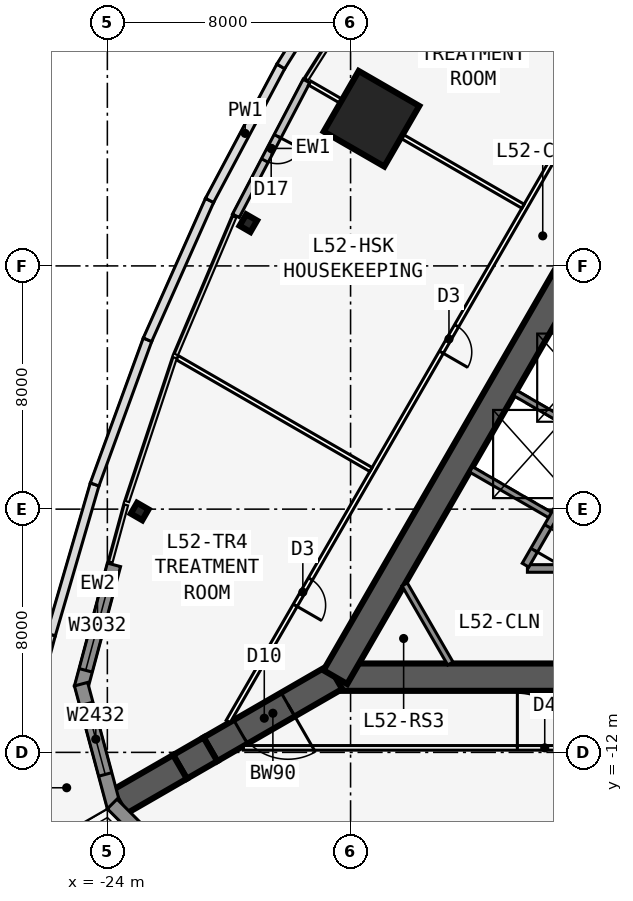
"""IFC4 building model, lengths in metres.
Left out: names, types, materials, properties, quantities, classifications, styles, units other than length and angle.
Written with IfcOpenShell. Run it as: python <this file> out.ifc"""

import sys

from ifc_helpers import new_model, si_unit, direction, frame, frame_2d, origin, origin_2d, place, context, subcontext, project, spatial, polyline, rectangle, i_section, outline, extrude, element, fill, save


model = new_model("IFC4")
c1 = context("Model", 3, precision=1e-05, world=origin(), true_north=direction((0.0, 1.0)))
c2 = subcontext(c1, "Body", "Model", "MODEL_VIEW")
j1 = project(units=[si_unit("LENGTHUNIT", "METRE"), si_unit("PLANEANGLEUNIT", "RADIAN")], contexts=[c1])
p1 = place(None, origin())
s1 = spatial("IfcSite", under=j1, at=p1, CompositionType="ELEMENT")
p2 = place(p1, origin())
s2 = spatial("IfcBuilding", under=s1, at=p2, CompositionType="ELEMENT")
p3 = place(p2, frame((0.0, 0.0, 195.9)))
s3 = spatial("IfcBuildingStorey", under=s2, at=p3, CompositionType="ELEMENT", Elevation=195.9)
p4 = place(p3, frame((-16.5, -9.526, 0.0), z_axis=(0.0, 0.0, 1.0), x_axis=(1.0, 0.0, 0.0)))
e1 = element("IfcWall", 1, at=p4, inside=s3, PredefinedType="SHEAR", context=c2, shape_type="SweptSolid", body=[
    extrude(rectangle(XDim=33.0, YDim=0.9, at=frame_2d((16.5, 0.0))), origin(), (0.0, 0.0, 1.0), 5.0),
])
p5 = place(p4, frame((14.05, 0.0, 0.0)))
e2 = element("IfcOpeningElement", 2, at=p5, cuts=e1, PredefinedType="OPENING", context=c2, shape_type="SweptSolid", body=[
    extrude(rectangle(XDim=1.8, YDim=2.13, at=frame_2d((0.9, 1.065))), frame((0.0, 0.46, 0.0), z_axis=(0.0, -1.0, 0.0), x_axis=(1.0, 0.0, 0.0)), (0.0, 0.0, 1.0), 0.92),
])
p6 = place(p3, frame((-10.183, -5.951, 0.0), z_axis=(0.0, 0.0, 1.0), x_axis=(1.0, 0.0, 0.0)))
e3 = element("IfcWall", 3, at=p6, inside=s3, PredefinedType="SOLIDWALL", context=c2, shape_type="SweptSolid", body=[
    extrude(rectangle(XDim=7.633, YDim=0.25, at=frame_2d((3.816, 0.0))), origin(), (0.0, 0.0, 1.0), 4.835),
])
p7 = place(p3, frame((0.0, 19.052, 0.0), z_axis=(0.0, 0.0, 1.0), x_axis=(-0.499999749417, -0.866025548458, 0.0)))
e4 = element("IfcWall", 4, at=p7, inside=s3, PredefinedType="SHEAR", context=c2, shape_type="SweptSolid", body=[
    extrude(rectangle(XDim=33.0, YDim=0.9, at=frame_2d((16.5, 0.0))), origin(), (0.0, 0.0, 1.0), 5.0),
])
p8 = place(p7, frame((14.15, 0.0, 0.0)))
e5 = element("IfcOpeningElement", 5, at=p8, cuts=e4, PredefinedType="OPENING", context=c2, shape_type="SweptSolid", body=[
    extrude(rectangle(XDim=1.8, YDim=2.13, at=frame_2d((0.9, 1.065))), frame((0.0, 0.46, 0.0), z_axis=(0.0, -1.0, 0.0), x_axis=(1.0, 0.0, 0.0)), (0.0, 0.0, 1.0), 0.92),
])
p9 = place(p7, frame((12.6, 0.0, 0.0)))
e6 = element("IfcOpeningElement", 6, at=p9, cuts=e4, PredefinedType="OPENING", context=c2, shape_type="SweptSolid", body=[
    extrude(rectangle(XDim=1.0, YDim=2.13, at=frame_2d((0.5, 1.065))), frame((0.0, 0.46, 0.0), z_axis=(0.0, -1.0, 0.0), x_axis=(1.0, 0.0, 0.0)), (0.0, 0.0, 1.0), 0.92),
])
p10 = place(p3, frame((-4.929, 3.365, 0.0), z_axis=(0.0, 0.0, 1.0), x_axis=(-0.499991433582, -0.866030349552, 0.0)))
e7 = element("IfcWall", 7, at=p10, inside=s3, PredefinedType="SOLIDWALL", context=c2, shape_type="SweptSolid", body=[
    extrude(rectangle(XDim=10.633, YDim=0.25, at=frame_2d((5.316, 0.0))), origin(), (0.0, 0.0, 1.0), 4.835),
])
p11 = place(p10, frame((9.164, 0.0, 0.0)))
e8 = element("IfcOpeningElement", 8, at=p11, cuts=e7, PredefinedType="OPENING", context=c2, shape_type="SweptSolid", body=[
    extrude(rectangle(XDim=0.9, YDim=2.13, at=frame_2d((0.45, 1.065))), frame((0.0, 0.135, 0.0), z_axis=(0.0, -1.0, 0.0), x_axis=(1.0, 0.0, 0.0)), (0.0, 0.0, 1.0), 0.27),
])
p12 = place(p10, frame((1.0, 0.0, 0.0)))
e9 = element("IfcOpeningElement", 9, at=p12, cuts=e7, PredefinedType="OPENING", context=c2, shape_type="SweptSolid", body=[
    extrude(rectangle(XDim=1.1, YDim=2.13, at=frame_2d((0.55, 1.065))), frame((0.0, 0.135, 0.0), z_axis=(0.0, -1.0, 0.0), x_axis=(1.0, 0.0, 0.0)), (0.0, 0.0, 1.0), 0.27),
])
p13 = place(p10, frame((3.9, 0.0, 0.0)))
e10 = element("IfcOpeningElement", 10, at=p13, cuts=e7, PredefinedType="OPENING", context=c2, shape_type="SweptSolid", body=[
    extrude(rectangle(XDim=1.1, YDim=2.13, at=frame_2d((0.55, 1.065))), frame((0.0, 0.135, 0.0), z_axis=(0.0, -1.0, 0.0), x_axis=(1.0, 0.0, 0.0)), (0.0, 0.0, 1.0), 0.27),
])
for number, where, z_axis, x_axis in (
    (11, (-7.879, -1.744, 0.0), (0.0, 0.0, 1.0), (-0.866, 0.5, 0.0)),
    (12, (-9.329, -4.256, 0.0), (0.0, 0.0, 1.0), (-0.866, 0.5, 0.0)),
):
    element("IfcWall", number, at=place(p3, frame(where, z_axis=z_axis, x_axis=x_axis)), inside=s3, PredefinedType="SOLIDWALL", context=c2, shape_type="SweptSolid", body=[
        extrude(rectangle(XDim=3.125, YDim=0.2, at=frame_2d((1.562, 0.0))), origin(), (0.0, 0.0, 1.0), 4.835),
    ])
p14 = place(p3, frame((-16.5, -9.526, 0.0), z_axis=(0.0, 0.0, 1.0), x_axis=(-0.866031398331, -0.499989616998, 0.0)))
e13 = element("IfcWall", 13, at=p14, inside=s3, PredefinedType="SHEAR", context=c2, shape_type="SweptSolid", body=[
    extrude(rectangle(XDim=4.746, YDim=0.9, at=frame_2d((2.373, 0.0))), origin(), (0.0, 0.0, 1.0), 5.0),
])
p15 = place(p14, frame((1.8, 0.0, 0.0)))
e14 = element("IfcOpeningElement", 14, at=p15, cuts=e13, PredefinedType="OPENING", context=c2, shape_type="SweptSolid", body=[
    extrude(rectangle(XDim=1.8, YDim=2.13, at=frame_2d((0.9, 1.065))), frame((0.0, 0.46, 0.0), z_axis=(0.0, -1.0, 0.0), x_axis=(1.0, 0.0, 0.0)), (0.0, 0.0, 1.0), 0.92),
])
p16 = place(p3, frame((-20.61, -11.899, 0.0), z_axis=(0.0, 0.0, 1.0), x_axis=(-0.866009537788, -0.500027479704, 0.0)))
e15 = element("IfcWall", 15, at=p16, inside=s3, PredefinedType="SHEAR", context=c2, shape_type="SweptSolid", body=[
    extrude(rectangle(XDim=1.155, YDim=0.9, at=frame_2d((0.577, 0.0))), origin(), (0.0, 0.0, 1.0), 5.0),
])
p17 = place(p3, frame((-21.61, -12.477, 0.0), z_axis=(0.0, 0.0, 1.0), x_axis=(-0.866055313784, -0.499948190782, 0.0)))
e16 = element("IfcWall", 16, at=p17, inside=s3, PredefinedType="SHEAR", context=c2, shape_type="SweptSolid", body=[
    extrude(rectangle(XDim=2.309, YDim=0.9, at=frame_2d((1.155, 0.0))), origin(), (0.0, 0.0, 1.0), 5.0),
])
for number, where, z_axis, x_axis in (
    (17, (-19.363, 5.406, 0.0), (0.0, 0.0, 1.0), (-0.866, 0.5, 0.0)),
    (18, (-22.937, -4.078, 0.0), (0.0, 0.0, 1.0), (-0.5, -0.866, 0.0)),
):
    element("IfcColumn", number, at=place(p3, frame(where, z_axis=z_axis, x_axis=x_axis)), inside=s3, PredefinedType="COLUMN", context=c2, shape_type="SweptSolid", body=[
        extrude(i_section(OverallWidth=0.411, OverallDepth=0.434, WebThickness=0.036, FlangeThickness=0.057, at=origin_2d()), origin(), (0.0, 0.0, 1.0), 5.0),
    ])
p18 = place(p3, frame((-15.312, 8.84, 0.0), z_axis=(0.0, 0.0, 1.0), x_axis=(-0.866025403784, 0.5, 0.0)))
e19 = element("IfcColumn", 19, at=p18, inside=s3, PredefinedType="COLUMN", context=c2, shape_type="SweptSolid", body=[
    extrude(rectangle(XDim=2.3, YDim=2.3, at=origin_2d()), origin(), (0.0, 0.0, 1.0), 5.0),
])
p19 = place(p3, frame((-17.45, 10.081, 0.0), z_axis=(0.0, 0.0, 1.0), x_axis=(-0.463976002579, -0.885847768542, 0.0)))
e20 = element("IfcWall", 20, at=p19, inside=s3, PredefinedType="STANDARD", context=c2, shape_type="SweptSolid", body=[
    extrude(rectangle(XDim=5.004, YDim=0.25, at=frame_2d((2.502, 0.0))), origin(), (0.0, 0.0, 1.0), 4.835),
])
p20 = place(p19, frame((2.052, 0.0, 0.0)))
e21 = element("IfcOpeningElement", 21, at=p20, cuts=e20, PredefinedType="OPENING", context=c2, shape_type="SweptSolid", body=[
    extrude(rectangle(XDim=0.9, YDim=2.13, at=frame_2d((0.45, 1.065))), frame((0.0, 0.135, 0.0), z_axis=(0.0, -1.0, 0.0), x_axis=(1.0, 0.0, 0.0)), (0.0, 0.0, 1.0), 0.27),
])
p21 = place(p3, frame((-23.783, -5.832, 0.0), z_axis=(0.0, 0.0, 1.0), x_axis=(-0.258784695888, -0.965935029479, 0.0)))
e22 = element("IfcWall", 22, at=p21, inside=s3, PredefinedType="SOLIDWALL", context=c2, shape_type="SweptSolid", body=[
    extrude(rectangle(XDim=4.184, YDim=0.45, at=frame_2d((2.092, 0.0))), origin(), (0.0, 0.0, 1.0), 4.835),
])
p22 = place(p21, frame((0.592, 0.0, 0.6)))
e23 = element("IfcOpeningElement", 23, at=p22, cuts=e22, PredefinedType="OPENING", context=c2, shape_type="SweptSolid", body=[
    extrude(rectangle(XDim=3.0, YDim=3.2, at=frame_2d((1.5, 1.6))), frame((0.0, 0.235, 0.0), z_axis=(0.0, -1.0, 0.0), x_axis=(1.0, 0.0, 0.0)), (0.0, 0.0, 1.0), 0.47),
])
p23 = place(p3, frame((-24.865, -9.757, 0.0), z_axis=(0.0, 0.0, 1.0), x_axis=(0.258799282522, -0.96593112144, 0.0)))
e24 = element("IfcWall", 24, at=p23, inside=s3, PredefinedType="SOLIDWALL", context=c2, shape_type="SweptSolid", body=[
    extrude(outline(polyline([(4.184, 0.225), (4.125, 0.225), (3.633, 0.093), (3.597, 0.225), (0.0, 0.225), (0.0, -0.225), (4.184, -0.225), (4.184, 0.225)])), origin(), (0.0, 0.0, 1.0), 4.835),
])
p24 = place(p23, frame((0.674, 0.0, 0.6)))
e25 = element("IfcOpeningElement", 25, at=p24, cuts=e24, PredefinedType="OPENING", context=c2, shape_type="SweptSolid", body=[
    extrude(rectangle(XDim=2.4, YDim=3.2, at=frame_2d((1.2, 1.6))), frame((0.0, 0.235, 0.0), z_axis=(0.0, -1.0, 0.0), x_axis=(1.0, 0.0, 0.0)), (0.0, 0.0, 1.0), 0.47),
])
p25 = place(p3, frame((-23.841, -13.697, 0.0), z_axis=(0.0, 0.0, 1.0), x_axis=(0.707077605902, -0.707135955267, 0.0)))
e26 = element("IfcWall", 26, at=p25, inside=s3, PredefinedType="SOLIDWALL", context=c2, shape_type="SweptSolid", body=[
    extrude(outline(polyline([(4.184, 0.225), (0.586, 0.225), (0.551, 0.093), (0.059, 0.225), (0.0, 0.225), (0.0, -0.225), (4.184, -0.225), (4.184, 0.225)])), origin(), (0.0, 0.0, 1.0), 4.835),
])
p26 = place(p25, frame((1.11, 0.0, 0.6)))
e27 = element("IfcOpeningElement", 27, at=p26, cuts=e26, PredefinedType="OPENING", context=c2, shape_type="SweptSolid", body=[
    extrude(rectangle(XDim=2.4, YDim=3.2, at=frame_2d((1.2, 1.6))), frame((0.0, 0.235, 0.0), z_axis=(0.0, -1.0, 0.0), x_axis=(1.0, 0.0, 0.0)), (0.0, 0.0, 1.0), 0.47),
])
p27 = place(p3, frame((-25.865, -14.934, 0.0), z_axis=(0.0, 0.0, 1.0), x_axis=(-0.258837025974, 0.96592100815, 0.0)))
e28 = element("IfcWall", 28, at=p27, inside=s3, PredefinedType="PARAPET", context=c2, shape_type="SweptSolid", body=[
    extrude(rectangle(XDim=3.506, YDim=0.3, at=frame_2d((1.753, 0.0))), origin(), (0.0, 0.0, 1.0), 1.1),
])
p28 = place(p3, frame((-26.773, -11.547, 0.0), z_axis=(0.0, 0.0, 1.0), x_axis=(0.258837072303, 0.965920995735, 0.0)))
e29 = element("IfcWall", 29, at=p28, inside=s3, PredefinedType="PARAPET", context=c2, shape_type="SweptSolid", body=[
    extrude(rectangle(XDim=3.545, YDim=0.3, at=frame_2d((1.772, 0.0))), origin(), (0.0, 0.0, 1.0), 1.1),
])
p29 = place(p3, frame((-25.855, -8.123, 0.0), z_axis=(0.0, 0.0, 1.0), x_axis=(0.279553216384, 0.960130199093, 0.0)))
e30 = element("IfcWall", 30, at=p29, inside=s3, PredefinedType="PARAPET", context=c2, shape_type="SweptSolid", body=[
    extrude(rectangle(XDim=5.141, YDim=0.3, at=frame_2d((2.571, 0.0))), origin(), (0.0, 0.0, 1.0), 1.1),
])
p30 = place(p3, frame((-24.418, -3.187, 0.0), z_axis=(0.0, 0.0, 1.0), x_axis=(0.343193770581, 0.939264625031, 0.0)))
e31 = element("IfcWall", 31, at=p30, inside=s3, PredefinedType="PARAPET", context=c2, shape_type="SweptSolid", body=[
    extrude(rectangle(XDim=5.066, YDim=0.3, at=frame_2d((2.533, 0.0))), origin(), (0.0, 0.0, 1.0), 1.1),
])
p31 = place(p3, frame((-22.68, 1.571, 0.0), z_axis=(0.0, 0.0, 1.0), x_axis=(0.406847176186, 0.913496237118, 0.0)))
e32 = element("IfcWall", 32, at=p31, inside=s3, PredefinedType="PARAPET", context=c2, shape_type="SweptSolid", body=[
    extrude(rectangle(XDim=5.017, YDim=0.3, at=frame_2d((2.509, 0.0))), origin(), (0.0, 0.0, 1.0), 1.1),
])
p32 = place(p3, frame((-20.638, 6.154, 0.0), z_axis=(0.0, 0.0, 1.0), x_axis=(0.469412641147, 0.882978919528, 0.0)))
e33 = element("IfcWall", 33, at=p32, inside=s3, PredefinedType="PARAPET", context=c2, shape_type="SweptSolid", body=[
    extrude(rectangle(XDim=4.992, YDim=0.3, at=frame_2d((2.496, 0.0))), origin(), (0.0, 0.0, 1.0), 1.1),
])
p33 = place(p3, frame((-18.295, 10.562, 0.0), z_axis=(0.0, 0.0, 1.0), x_axis=(0.529972566993, 0.848014786566, 0.0)))
e34 = element("IfcWall", 34, at=p33, inside=s3, PredefinedType="PARAPET", context=c2, shape_type="SweptSolid", body=[
    extrude(rectangle(XDim=4.993, YDim=0.3, at=frame_2d((2.496, 0.0))), origin(), (0.0, 0.0, 1.0), 1.1),
])
p34 = place(p3, frame((-19.527, -11.851, 0.0), z_axis=(0.0, 0.0, 1.0), x_axis=(1.0, 0.0, 0.0)))
e35 = element("IfcWall", 35, at=p34, inside=s3, PredefinedType="PARTITIONING", context=c2, shape_type="SweptSolid", body=[
    extrude(rectangle(XDim=39.054, YDim=0.15, at=frame_2d((19.527, 0.0))), origin(), (0.0, 0.0, 1.0), 4.835),
])
p35 = place(p34, frame((9.013, 0.0, 0.0)))
e36 = element("IfcOpeningElement", 36, at=p35, cuts=e35, PredefinedType="OPENING", context=c2, shape_type="SweptSolid", body=[
    extrude(rectangle(XDim=1.8, YDim=2.13, at=frame_2d((0.9, 1.065))), frame((0.0, 0.085, 0.0), z_axis=(0.0, -1.0, 0.0), x_axis=(1.0, 0.0, 0.0)), (0.0, 0.0, 1.0), 0.17),
])
p36 = place(p34, frame((28.24, 0.0, 0.0)))
e37 = element("IfcOpeningElement", 37, at=p36, cuts=e35, PredefinedType="OPENING", context=c2, shape_type="SweptSolid", body=[
    extrude(rectangle(XDim=1.8, YDim=2.13, at=frame_2d((0.9, 1.065))), frame((0.0, 0.085, 0.0), z_axis=(0.0, -1.0, 0.0), x_axis=(1.0, 0.0, 0.0)), (0.0, 0.0, 1.0), 0.17),
])
p37 = place(p3, frame((-0.5, 22.836, 0.0), z_axis=(0.0, 0.0, 1.0), x_axis=(-0.500001677587, -0.866024435227, 0.0)))
e38 = element("IfcWall", 38, at=p37, inside=s3, PredefinedType="PARTITIONING", context=c2, shape_type="SweptSolid", body=[
    extrude(rectangle(XDim=39.054, YDim=0.15, at=frame_2d((19.527, 0.0))), origin(), (0.0, 0.0, 1.0), 4.835),
])
p38 = place(p37, frame((4.414, 0.0, 0.0)))
e39 = element("IfcOpeningElement", 39, at=p38, cuts=e38, PredefinedType="OPENING", context=c2, shape_type="SweptSolid", body=[
    extrude(rectangle(XDim=1.0, YDim=2.13, at=frame_2d((0.5, 1.065))), frame((0.0, 0.085, 0.0), z_axis=(0.0, -1.0, 0.0), x_axis=(1.0, 0.0, 0.0)), (0.0, 0.0, 1.0), 0.17),
])
p39 = place(p37, frame((10.527, 0.0, 0.0)))
e40 = element("IfcOpeningElement", 40, at=p39, cuts=e38, PredefinedType="OPENING", context=c2, shape_type="SweptSolid", body=[
    extrude(rectangle(XDim=1.0, YDim=2.13, at=frame_2d((0.5, 1.065))), frame((0.0, 0.085, 0.0), z_axis=(0.0, -1.0, 0.0), x_axis=(1.0, 0.0, 0.0)), (0.0, 0.0, 1.0), 0.17),
])
p40 = place(p37, frame((15.527, 0.0, 0.0)))
e41 = element("IfcOpeningElement", 41, at=p40, cuts=e38, PredefinedType="OPENING", context=c2, shape_type="SweptSolid", body=[
    extrude(rectangle(XDim=1.0, YDim=2.13, at=frame_2d((0.5, 1.065))), frame((0.0, 0.085, 0.0), z_axis=(0.0, -1.0, 0.0), x_axis=(1.0, 0.0, 0.0)), (0.0, 0.0, 1.0), 0.17),
])
p41 = place(p37, frame((24.027, 0.0, 0.0)))
e42 = element("IfcOpeningElement", 42, at=p41, cuts=e38, PredefinedType="OPENING", context=c2, shape_type="SweptSolid", body=[
    extrude(rectangle(XDim=1.0, YDim=2.13, at=frame_2d((0.5, 1.065))), frame((0.0, 0.085, 0.0), z_axis=(0.0, -1.0, 0.0), x_axis=(1.0, 0.0, 0.0)), (0.0, 0.0, 1.0), 0.17),
])
p42 = place(p37, frame((33.64, 0.0, 0.0)))
e43 = element("IfcOpeningElement", 43, at=p42, cuts=e38, PredefinedType="OPENING", context=c2, shape_type="SweptSolid", body=[
    extrude(rectangle(XDim=1.0, YDim=2.13, at=frame_2d((0.5, 1.065))), frame((0.0, 0.085, 0.0), z_axis=(0.0, -1.0, 0.0), x_axis=(1.0, 0.0, 0.0)), (0.0, 0.0, 1.0), 0.17),
])
p43 = place(p3, frame((-10.329, 5.963, 0.0), z_axis=(0.0, 0.0, 1.0), x_axis=(-0.866016460812, 0.500015489362, 0.0)))
e44 = element("IfcWall", 44, at=p43, inside=s3, PredefinedType="PARTITIONING", context=c2, shape_type="SweptSolid", body=[
    extrude(rectangle(XDim=8.101, YDim=0.15, at=frame_2d((4.051, 0.0))), origin(), (0.0, 0.0, 1.0), 3.989),
])
p44 = place(p3, frame((-15.329, -2.697, 0.0), z_axis=(0.0, 0.0, 1.0), x_axis=(-0.866032463813, 0.499987771473, 0.0)))
e45 = element("IfcWall", 45, at=p44, inside=s3, PredefinedType="PARTITIONING", context=c2, shape_type="SweptSolid", body=[
    extrude(rectangle(XDim=7.355, YDim=0.15, at=frame_2d((3.677, 0.0))), origin(), (0.0, 0.0, 1.0), 3.989),
])
p45 = place(p3, frame((-12.719, -9.076, 0.0), z_axis=(0.0, 0.0, 1.0), x_axis=(-0.499952404951, 0.866052881055, 0.0)))
e46 = element("IfcWall", 46, at=p45, inside=s3, PredefinedType="SOLIDWALL", context=c2, shape_type="SweptSolid", body=[
    extrude(rectangle(XDim=3.002, YDim=0.2, at=frame_2d((1.501, 0.0))), origin(), (0.0, 0.0, 1.0), 4.835),
])
p46 = place(p20, origin())
e47 = element("IfcDoor", 47, at=p46, inside=s3, OperationType="SINGLE_SWING_LEFT", PredefinedType="DOOR", context=c2, shape_type="SweptSolid", body=[
    extrude(rectangle(XDim=0.9, YDim=2.13, at=frame_2d((0.45, 1.065))), frame((0.0, 0.025, 0.0), z_axis=(0.0, -1.0, 0.0), x_axis=(1.0, 0.0, 0.0)), (0.0, 0.0, 1.0), 0.05),
])
fill(e21, e47)
p47 = place(p22, origin())
e48 = element("IfcWindow", 48, at=p47, inside=s3, PartitioningType="SINGLE_PANEL", PredefinedType="WINDOW", context=c2, shape_type="SweptSolid", body=[
    extrude(rectangle(XDim=3.0, YDim=3.2, at=frame_2d((1.5, 1.6))), frame((0.0, 0.03, 0.0), z_axis=(0.0, -1.0, 0.0), x_axis=(1.0, 0.0, 0.0)), (0.0, 0.0, 1.0), 0.06),
])
fill(e23, e48)
p48 = place(p24, origin())
e49 = element("IfcWindow", 49, at=p48, inside=s3, PartitioningType="SINGLE_PANEL", PredefinedType="WINDOW", context=c2, shape_type="SweptSolid", body=[
    extrude(rectangle(XDim=2.4, YDim=3.2, at=frame_2d((1.2, 1.6))), frame((0.0, 0.03, 0.0), z_axis=(0.0, -1.0, 0.0), x_axis=(1.0, 0.0, 0.0)), (0.0, 0.0, 1.0), 0.06),
])
fill(e25, e49)
p49 = place(p35, origin())
e50 = element("IfcDoor", 50, at=p49, inside=s3, OperationType="DOUBLE_DOOR_SINGLE_SWING", PredefinedType="DOOR", context=c2, shape_type="SweptSolid", body=[
    extrude(rectangle(XDim=1.8, YDim=2.13, at=frame_2d((0.9, 1.065))), frame((0.0, 0.025, 0.0), z_axis=(0.0, -1.0, 0.0), x_axis=(1.0, 0.0, 0.0)), (0.0, 0.0, 1.0), 0.05),
])
fill(e36, e50)
p50 = place(p41, origin())
e51 = element("IfcDoor", 51, at=p50, inside=s3, OperationType="SINGLE_SWING_RIGHT", PredefinedType="DOOR", context=c2, shape_type="SweptSolid", body=[
    extrude(rectangle(XDim=1.0, YDim=2.13, at=frame_2d((0.5, 1.065))), frame((0.0, 0.025, 0.0), z_axis=(0.0, -1.0, 0.0), x_axis=(1.0, 0.0, 0.0)), (0.0, 0.0, 1.0), 0.05),
])
fill(e42, e51)
p51 = place(p42, origin())
e52 = element("IfcDoor", 52, at=p51, inside=s3, OperationType="SINGLE_SWING_RIGHT", PredefinedType="DOOR", context=c2, shape_type="SweptSolid", body=[
    extrude(rectangle(XDim=1.0, YDim=2.13, at=frame_2d((0.5, 1.065))), frame((0.0, 0.025, 0.0), z_axis=(0.0, -1.0, 0.0), x_axis=(1.0, 0.0, 0.0)), (0.0, 0.0, 1.0), 0.05),
])
fill(e43, e52)
p52 = place(p15, origin())
e53 = element("IfcDoor", 53, at=p52, inside=s3, OperationType="DOUBLE_DOOR_DOUBLE_SWING", PredefinedType="DOOR", context=c2, shape_type="SweptSolid", body=[
    extrude(rectangle(XDim=1.8, YDim=2.13, at=frame_2d((0.9, 1.065))), frame((0.0, 0.025, 0.0), z_axis=(0.0, -1.0, 0.0), x_axis=(1.0, 0.0, 0.0)), (0.0, 0.0, 1.0), 0.05),
])
fill(e14, e53)
p53 = place(p11, origin())
e54 = element("IfcDoor", 54, at=p53, inside=s3, OperationType="SINGLE_SWING_RIGHT", PredefinedType="DOOR", context=c2, shape_type="SweptSolid", body=[
    extrude(rectangle(XDim=0.9, YDim=2.13, at=frame_2d((0.45, 1.065))), frame((0.0, 0.025, 0.0), z_axis=(0.0, -1.0, 0.0), x_axis=(1.0, 0.0, 0.0)), (0.0, 0.0, 1.0), 0.05),
])
fill(e8, e54)
save(model, sys.argv[1])
